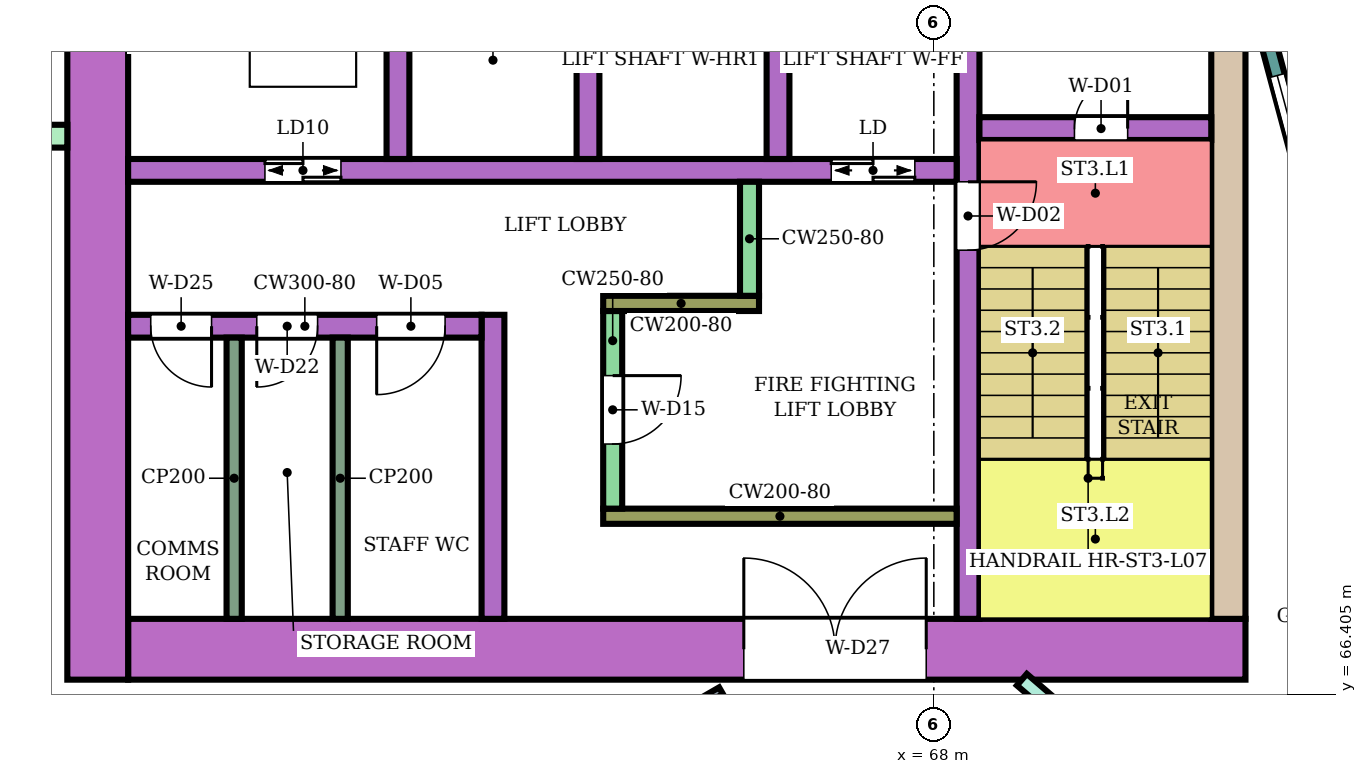
"""IFC4 building model, lengths in metres.
Left out: names, types, materials, properties, quantities, classifications, styles, units other than length and angle.
Written with IfcOpenShell. Run it as: python <this file> out.ifc"""

import sys

from ifc_helpers import new_model, si_unit, direction, frame, frame_2d, origin, place, context, subcontext, project, spatial, rectangle, extrude, element, fill, save


model = new_model("IFC4")
c1 = context("Model", 3, precision=1e-05, world=origin(), true_north=direction((0.0, 1.0)))
c2 = subcontext(c1, "Body", "Model", "MODEL_VIEW")
j1 = project(units=[si_unit("LENGTHUNIT", "METRE"), si_unit("PLANEANGLEUNIT", "RADIAN")], contexts=[c1])
p1 = place(None, origin())
s1 = spatial("IfcSite", under=j1, at=p1, CompositionType="ELEMENT")
p2 = place(p1, origin())
s2 = spatial("IfcBuilding", under=s1, at=p2, CompositionType="ELEMENT")
p3 = place(p2, frame((0.0, 0.0, 36.4)))
s3 = spatial("IfcBuildingStorey", under=s2, at=p3, CompositionType="ELEMENT", Elevation=36.4)
p4 = place(p3, frame((72.1, 67.0, 0.0), z_axis=(0.0, 0.0, 1.0), x_axis=(-1.0, 0.0, 0.0)))
e1 = element("IfcWall", 1, at=p4, inside=s3, PredefinedType="SHEAR", context=c2, shape_type="SweptSolid", body=[
    extrude(rectangle(XDim=14.7, YDim=0.8, at=frame_2d((7.35, 0.0))), origin(), (0.0, 0.0, 1.0), 3.48),
])
p5 = place(p4, frame((4.2, 0.0, 0.0)))
e2 = element("IfcOpeningElement", 2, at=p5, cuts=e1, PredefinedType="OPENING", context=c2, shape_type="SweptSolid", body=[
    extrude(rectangle(XDim=2.4, YDim=2.4, at=frame_2d((1.2, 1.2))), frame((0.0, 0.41, 0.0), z_axis=(0.0, -1.0, 0.0), x_axis=(1.0, 0.0, 0.0)), (0.0, 0.0, 1.0), 0.82),
])
p6 = place(p3, frame((71.875, 75.0, 0.0), z_axis=(0.0, 0.0, 1.0), x_axis=(0.0, -1.0, 0.0)))
e3 = element("IfcWall", 3, at=p6, inside=s3, PredefinedType="SHEAR", context=c2, shape_type="SweptSolid", body=[
    extrude(rectangle(XDim=7.6, YDim=0.45, at=frame_2d((3.8, 0.0))), origin(), (0.0, 0.0, 1.0), 3.48),
])
p7 = place(p3, frame((57.0, 83.4, 0.0), z_axis=(0.0, 0.0, 1.0), x_axis=(0.0, -1.0, 0.0)))
e4 = element("IfcWall", 4, at=p7, inside=s3, PredefinedType="SHEAR", context=c2, shape_type="SweptSolid", body=[
    extrude(rectangle(XDim=16.8, YDim=0.8, at=frame_2d((8.4, 0.0))), origin(), (0.0, 0.0, 1.0), 3.48),
])
p8 = place(p3, frame((68.45, 75.0, 0.0), z_axis=(0.0, 0.0, 1.0), x_axis=(0.0, -1.0, 0.0)))
e5 = element("IfcWall", 5, at=p8, inside=s3, PredefinedType="SHEAR", context=c2, shape_type="SweptSolid", body=[
    extrude(rectangle(XDim=7.6, YDim=0.3, at=frame_2d((3.8, 0.0))), origin(), (0.0, 0.0, 1.0), 3.48),
])
p9 = place(p8, frame((1.85, 0.0, 0.0)))
e6 = element("IfcOpeningElement", 6, at=p9, cuts=e5, PredefinedType="OPENING", context=c2, shape_type="SweptSolid", body=[
    extrude(rectangle(XDim=0.9, YDim=2.1, at=frame_2d((0.45, 1.05))), frame((0.0, 0.16, 0.0), z_axis=(0.0, -1.0, 0.0), x_axis=(1.0, 0.0, 0.0)), (0.0, 0.0, 1.0), 0.32),
])
p10 = place(p3, frame((71.65, 73.85, 0.0), z_axis=(0.0, 0.0, 1.0), x_axis=(-1.0, 0.0, 0.0)))
e7 = element("IfcWall", 7, at=p10, inside=s3, PredefinedType="SHEAR", context=c2, shape_type="SweptSolid", body=[
    extrude(rectangle(XDim=3.05, YDim=0.3, at=frame_2d((1.525, 0.0))), origin(), (0.0, 0.0, 1.0), 3.48),
])
p11 = place(p10, frame((1.1, 0.0, 0.0)))
e8 = element("IfcOpeningElement", 8, at=p11, cuts=e7, PredefinedType="OPENING", context=c2, shape_type="SweptSolid", body=[
    extrude(rectangle(XDim=0.7, YDim=2.0, at=frame_2d((0.35, 1.0))), frame((0.0, 0.16, 0.0), z_axis=(0.0, -1.0, 0.0), x_axis=(1.0, 0.0, 0.0)), (0.0, 0.0, 1.0), 0.32),
])
p12 = place(p3, frame((68.3, 73.3, 0.0), z_axis=(0.0, 0.0, 1.0), x_axis=(-1.0, 0.0, 0.0)))
e9 = element("IfcWall", 9, at=p12, inside=s3, PredefinedType="SHEAR", context=c2, shape_type="SweptSolid", body=[
    extrude(rectangle(XDim=10.9, YDim=0.3, at=frame_2d((5.45, 0.0))), origin(), (0.0, 0.0, 1.0), 3.48),
])
p13 = place(p12, frame((0.55, 0.0, 0.0)))
e10 = element("IfcOpeningElement", 10, at=p13, cuts=e9, PredefinedType="OPENING", context=c2, shape_type="SweptSolid", body=[
    extrude(rectangle(XDim=1.1, YDim=2.1, at=frame_2d((0.55, 1.05))), frame((0.0, 0.16, 0.0), z_axis=(0.0, -1.0, 0.0), x_axis=(1.0, 0.0, 0.0)), (0.0, 0.0, 1.0), 0.32),
])
p14 = place(p12, frame((8.1, 0.0, 0.0)))
e11 = element("IfcOpeningElement", 11, at=p14, cuts=e9, PredefinedType="OPENING", context=c2, shape_type="SweptSolid", body=[
    extrude(rectangle(XDim=1.0, YDim=2.1, at=frame_2d((0.5, 1.05))), frame((0.0, 0.16, 0.0), z_axis=(0.0, -1.0, 0.0), x_axis=(1.0, 0.0, 0.0)), (0.0, 0.0, 1.0), 0.32),
])
for number, where, z_axis, x_axis in (
    (12, (65.95, 76.0, 0.0), (0.0, 0.0, 1.0), (0.0, -1.0, 0.0)),
    (13, (63.45, 76.0, 0.0), (0.0, 0.0, 1.0), (0.0, -1.0, 0.0)),
    (14, (60.95, 76.0, 0.0), (0.0, 0.0, 1.0), (0.0, -1.0, 0.0)),
):
    element("IfcWall", number, at=place(p3, frame(where, z_axis=z_axis, x_axis=x_axis)), inside=s3, PredefinedType="SHEAR", context=c2, shape_type="SweptSolid", body=[
        extrude(rectangle(XDim=2.55, YDim=0.3, at=frame_2d((1.275, 0.0))), origin(), (0.0, 0.0, 1.0), 3.48),
    ])
p15 = place(p3, frame((68.3, 68.75, 0.0), z_axis=(0.0, 0.0, 1.0), x_axis=(-1.0, 0.0, 0.0)))
e15 = element("IfcWall", 15, at=p15, inside=s3, PredefinedType="SHEAR", context=c2, shape_type="SweptSolid", body=[
    extrude(rectangle(XDim=4.65, YDim=0.2, at=frame_2d((2.325, 0.0))), origin(), (0.0, 0.0, 1.0), 3.48),
])
p16 = place(p3, frame((63.775, 71.45, 0.0), z_axis=(0.0, 0.0, 1.0), x_axis=(0.0, -1.0, 0.0)))
e16 = element("IfcWall", 16, at=p16, inside=s3, PredefinedType="SHEAR", context=c2, shape_type="SweptSolid", body=[
    extrude(rectangle(XDim=2.6, YDim=0.25, at=frame_2d((1.3, 0.0))), origin(), (0.0, 0.0, 1.0), 3.48),
])
p17 = place(p16, frame((0.85, 0.0, 0.0)))
e17 = element("IfcOpeningElement", 17, at=p17, cuts=e16, PredefinedType="OPENING", context=c2, shape_type="SweptSolid", body=[
    extrude(rectangle(XDim=0.9, YDim=2.1, at=frame_2d((0.45, 1.05))), frame((0.0, 0.135, 0.0), z_axis=(0.0, -1.0, 0.0), x_axis=(1.0, 0.0, 0.0)), (0.0, 0.0, 1.0), 0.27),
])
p18 = place(p3, frame((65.7, 71.55, 0.0), z_axis=(0.0, 0.0, 1.0), x_axis=(-1.0, 0.0, 0.0)))
e18 = element("IfcWall", 18, at=p18, inside=s3, PredefinedType="SHEAR", context=c2, shape_type="SweptSolid", body=[
    extrude(rectangle(XDim=2.05, YDim=0.2, at=frame_2d((1.025, 0.0))), origin(), (0.0, 0.0, 1.0), 3.48),
])
p19 = place(p3, frame((65.575, 73.15, 0.0), z_axis=(0.0, 0.0, 1.0), x_axis=(0.0, -1.0, 0.0)))
e19 = element("IfcWall", 19, at=p19, inside=s3, PredefinedType="SHEAR", context=c2, shape_type="SweptSolid", body=[
    extrude(rectangle(XDim=1.5, YDim=0.25, at=frame_2d((0.75, 0.0))), origin(), (0.0, 0.0, 1.0), 3.48),
])
p20 = place(p3, frame((62.2, 71.4, 0.0), z_axis=(0.0, 0.0, 1.0), x_axis=(0.0, -1.0, 0.0)))
e20 = element("IfcWall", 20, at=p20, inside=s3, PredefinedType="SHEAR", context=c2, shape_type="SweptSolid", body=[
    extrude(rectangle(XDim=4.0, YDim=0.3, at=frame_2d((2.0, 0.0))), origin(), (0.0, 0.0, 1.0), 3.48),
])
p21 = place(p3, frame((62.05, 71.25, 0.0), z_axis=(0.0, 0.0, 1.0), x_axis=(-1.0, 0.0, 0.0)))
e21 = element("IfcWall", 21, at=p21, inside=s3, PredefinedType="SHEAR", context=c2, shape_type="SweptSolid", body=[
    extrude(rectangle(XDim=4.65, YDim=0.3, at=frame_2d((2.325, 0.0))), origin(), (0.0, 0.0, 1.0), 3.48),
])
p22 = place(p21, frame((0.48, 0.0, 0.0)))
e22 = element("IfcOpeningElement", 22, at=p22, cuts=e21, PredefinedType="OPENING", context=c2, shape_type="SweptSolid", body=[
    extrude(rectangle(XDim=0.9, YDim=2.1, at=frame_2d((0.45, 1.05))), frame((0.0, 0.16, 0.0), z_axis=(0.0, -1.0, 0.0), x_axis=(1.0, 0.0, 0.0)), (0.0, 0.0, 1.0), 0.32),
])
p23 = place(p21, frame((2.157, 0.0, 0.0)))
e23 = element("IfcOpeningElement", 23, at=p23, cuts=e21, PredefinedType="OPENING", context=c2, shape_type="SweptSolid", body=[
    extrude(rectangle(XDim=0.8, YDim=2.1, at=frame_2d((0.4, 1.05))), frame((0.0, 0.16, 0.0), z_axis=(0.0, -1.0, 0.0), x_axis=(1.0, 0.0, 0.0)), (0.0, 0.0, 1.0), 0.32),
])
p24 = place(p21, frame((3.552, 0.0, 0.0)))
e24 = element("IfcOpeningElement", 24, at=p24, cuts=e21, PredefinedType="OPENING", context=c2, shape_type="SweptSolid", body=[
    extrude(rectangle(XDim=0.8, YDim=2.1, at=frame_2d((0.4, 1.05))), frame((0.0, 0.16, 0.0), z_axis=(0.0, -1.0, 0.0), x_axis=(1.0, 0.0, 0.0)), (0.0, 0.0, 1.0), 0.32),
])
p25 = place(p3, frame((56.6, 73.75, 0.0), z_axis=(0.0, 0.0, 1.0), x_axis=(-1.0, 0.0, 0.0)))
e25 = element("IfcWall", 25, at=p25, inside=s3, PredefinedType="NOTDEFINED", context=c2, shape_type="SweptSolid", body=[
    extrude(rectangle(XDim=2.416, YDim=0.3, at=frame_2d((1.208, 0.0))), origin(), (0.0, 0.0, 1.0), 3.8),
])
p26 = place(p3, frame((72.396, 75.0, 0.0), z_axis=(0.0, 0.0, 1.0), x_axis=(0.258789828301, -0.965933654434, 0.0)))
e26 = element("IfcWall", 26, at=p26, inside=s3, PredefinedType="NOTDEFINED", context=c2, shape_type="SweptSolid", body=[
    extrude(rectangle(XDim=3.936, YDim=0.2, at=frame_2d((1.968, 0.0))), origin(), (0.0, 0.0, 1.0), 3.8),
])
p27 = place(p26, frame((0.468, 0.0, 0.9)))
e27 = element("IfcOpeningElement", 27, at=p27, cuts=e26, PredefinedType="OPENING", context=c2, shape_type="SweptSolid", body=[
    extrude(rectangle(XDim=3.0, YDim=2.3, at=frame_2d((1.5, 1.15))), frame((0.0, 0.11, 0.0), z_axis=(0.0, -1.0, 0.0), x_axis=(1.0, 0.0, 0.0)), (0.0, 0.0, 1.0), 0.22),
])
p28 = place(p3, frame((69.158, 66.6, 0.0), z_axis=(0.0, 0.0, 1.0), x_axis=(0.757976058094, -0.652282373943, 0.0)))
e28 = element("IfcWall", 28, at=p28, inside=s3, PredefinedType="PARTITIONING", context=c2, shape_type="SweptSolid", body=[
    extrude(rectangle(XDim=5.16, YDim=0.2, at=frame_2d((2.58, 0.0))), origin(), (0.0, 0.0, 1.0), 3.35),
])
p29 = place(p28, frame((1.6, 0.0, 0.0)))
e29 = element("IfcOpeningElement", 29, at=p29, cuts=e28, PredefinedType="OPENING", context=c2, shape_type="SweptSolid", body=[
    extrude(rectangle(XDim=1.0, YDim=2.1, at=frame_2d((0.5, 1.05))), frame((0.0, 0.11, 0.0), z_axis=(0.0, -1.0, 0.0), x_axis=(1.0, 0.0, 0.0)), (0.0, 0.0, 1.0), 0.22),
])
p30 = place(p3, frame((57.659, 62.101, 0.0), z_axis=(0.0, 0.0, 1.0), x_axis=(0.86602264145, 0.500004784474, 0.0)))
e30 = element("IfcWall", 30, at=p30, inside=s3, PredefinedType="PARTITIONING", context=c2, shape_type="SweptSolid", body=[
    extrude(rectangle(XDim=8.708, YDim=0.1, at=frame_2d((4.354, 0.0))), origin(), (0.0, 0.0, 1.0), 3.35),
])
p31 = place(p30, frame((3.929, 0.0, 0.0)))
e31 = element("IfcOpeningElement", 31, at=p31, cuts=e30, PredefinedType="OPENING", context=c2, shape_type="SweptSolid", body=[
    extrude(rectangle(XDim=0.9, YDim=2.1, at=frame_2d((0.45, 1.05))), frame((0.0, 0.06, 0.0), z_axis=(0.0, -1.0, 0.0), x_axis=(1.0, 0.0, 0.0)), (0.0, 0.0, 1.0), 0.12),
])
p32 = place(p3, frame((71.596, 64.635, 0.0), z_axis=(0.0, 0.0, 1.0), x_axis=(0.652285007511, 0.757973791748, 0.0)))
e32 = element("IfcWall", 32, at=p32, inside=s3, PredefinedType="PARTITIONING", context=c2, shape_type="SweptSolid", body=[
    extrude(rectangle(XDim=2.65, YDim=0.1, at=frame_2d((1.325, 0.0))), origin(), (0.0, 0.0, 1.0), 3.35),
])
p33 = place(p32, frame((0.6, 0.0, 0.0)))
e33 = element("IfcOpeningElement", 33, at=p33, cuts=e32, PredefinedType="OPENING", context=c2, shape_type="SweptSolid", body=[
    extrude(rectangle(XDim=0.8, YDim=2.1, at=frame_2d((0.4, 1.05))), frame((0.0, 0.06, 0.0), z_axis=(0.0, -1.0, 0.0), x_axis=(1.0, 0.0, 0.0)), (0.0, 0.0, 1.0), 0.12),
])
for number, where, z_axis, x_axis in (
    (34, (60.19, 71.1, 0.0), (0.0, 0.0, 1.0), (0.0, -1.0, 0.0)),
    (35, (58.795, 71.1, 0.0), (0.0, 0.0, 1.0), (0.0, -1.0, 0.0)),
):
    element("IfcWall", number, at=place(p3, frame(where, z_axis=z_axis, x_axis=x_axis)), inside=s3, PredefinedType="PARTITIONING", context=c2, shape_type="SweptSolid", body=[
        extrude(rectangle(XDim=3.7, YDim=0.2, at=frame_2d((1.85, 0.0))), origin(), (0.0, 0.0, 1.0), 3.48),
    ])
p34 = place(p27, origin())
e36 = element("IfcWindow", 36, at=p34, inside=s3, PartitioningType="SINGLE_PANEL", PredefinedType="WINDOW", context=c2, shape_type="SweptSolid", body=[
    extrude(rectangle(XDim=3.0, YDim=2.3, at=frame_2d((1.5, 1.15))), frame((0.0, 0.03, 0.0), z_axis=(0.0, -1.0, 0.0), x_axis=(1.0, 0.0, 0.0)), (0.0, 0.0, 1.0), 0.06),
])
fill(e27, e36)
p35 = place(p11, frame((0.7, 0.0, 0.0), z_axis=(0.0, 0.0, 1.0), x_axis=(-1.0, 0.0, 0.0)))
e37 = element("IfcDoor", 37, at=p35, inside=s3, OperationType="SINGLE_SWING_RIGHT", PredefinedType="DOOR", context=c2, shape_type="SweptSolid", body=[
    extrude(rectangle(XDim=0.7, YDim=2.0, at=frame_2d((0.35, 1.0))), frame((0.0, 0.025, 0.0), z_axis=(0.0, -1.0, 0.0), x_axis=(1.0, 0.0, 0.0)), (0.0, 0.0, 1.0), 0.05),
])
fill(e8, e37)
p36 = place(p9, origin())
e38 = element("IfcDoor", 38, at=p36, inside=s3, OperationType="SINGLE_SWING_LEFT", PredefinedType="DOOR", context=c2, shape_type="SweptSolid", body=[
    extrude(rectangle(XDim=0.9, YDim=2.1, at=frame_2d((0.45, 1.05))), frame((0.0, 0.025, 0.0), z_axis=(0.0, -1.0, 0.0), x_axis=(1.0, 0.0, 0.0)), (0.0, 0.0, 1.0), 0.05),
])
fill(e6, e38)
p37 = place(p13, origin())
e39 = element("IfcDoor", 39, at=p37, inside=s3, OperationType="DOUBLE_DOOR_SLIDING", PredefinedType="DOOR", context=c2, shape_type="SweptSolid", body=[
    extrude(rectangle(XDim=1.1, YDim=2.1, at=frame_2d((0.55, 1.05))), frame((0.0, 0.025, 0.0), z_axis=(0.0, -1.0, 0.0), x_axis=(1.0, 0.0, 0.0)), (0.0, 0.0, 1.0), 0.05),
])
fill(e10, e39)
p38 = place(p14, origin())
e40 = element("IfcDoor", 40, at=p38, inside=s3, OperationType="DOUBLE_DOOR_SLIDING", PredefinedType="DOOR", context=c2, shape_type="SweptSolid", body=[
    extrude(rectangle(XDim=1.0, YDim=2.1, at=frame_2d((0.5, 1.05))), frame((0.0, 0.025, 0.0), z_axis=(0.0, -1.0, 0.0), x_axis=(1.0, 0.0, 0.0)), (0.0, 0.0, 1.0), 0.05),
])
fill(e11, e40)
p39 = place(p17, origin())
e41 = element("IfcDoor", 41, at=p39, inside=s3, OperationType="SINGLE_SWING_LEFT", PredefinedType="DOOR", context=c2, shape_type="SweptSolid", body=[
    extrude(rectangle(XDim=0.9, YDim=2.1, at=frame_2d((0.45, 1.05))), frame((0.0, 0.025, 0.0), z_axis=(0.0, -1.0, 0.0), x_axis=(1.0, 0.0, 0.0)), (0.0, 0.0, 1.0), 0.05),
])
fill(e17, e41)
p40 = place(p22, origin())
e42 = element("IfcDoor", 42, at=p40, inside=s3, OperationType="SINGLE_SWING_RIGHT", PredefinedType="DOOR", context=c2, shape_type="SweptSolid", body=[
    extrude(rectangle(XDim=0.9, YDim=2.1, at=frame_2d((0.45, 1.05))), frame((0.0, 0.025, 0.0), z_axis=(0.0, -1.0, 0.0), x_axis=(1.0, 0.0, 0.0)), (0.0, 0.0, 1.0), 0.05),
])
fill(e22, e42)
p41 = place(p23, origin())
e43 = element("IfcDoor", 43, at=p41, inside=s3, OperationType="SINGLE_SWING_RIGHT", PredefinedType="DOOR", context=c2, shape_type="SweptSolid", body=[
    extrude(rectangle(XDim=0.8, YDim=2.1, at=frame_2d((0.4, 1.05))), frame((0.0, 0.025, 0.0), z_axis=(0.0, -1.0, 0.0), x_axis=(1.0, 0.0, 0.0)), (0.0, 0.0, 1.0), 0.05),
])
fill(e23, e43)
p42 = place(p24, origin())
e44 = element("IfcDoor", 44, at=p42, inside=s3, OperationType="SINGLE_SWING_LEFT", PredefinedType="DOOR", context=c2, shape_type="SweptSolid", body=[
    extrude(rectangle(XDim=0.8, YDim=2.1, at=frame_2d((0.4, 1.05))), frame((0.0, 0.025, 0.0), z_axis=(0.0, -1.0, 0.0), x_axis=(1.0, 0.0, 0.0)), (0.0, 0.0, 1.0), 0.05),
])
fill(e24, e44)
p43 = place(p5, frame((2.4, 0.0, 0.0), z_axis=(0.0, 0.0, 1.0), x_axis=(-1.0, 0.0, 0.0)))
e45 = element("IfcDoor", 45, at=p43, inside=s3, OperationType="DOUBLE_DOOR_SINGLE_SWING", PredefinedType="DOOR", context=c2, shape_type="SweptSolid", body=[
    extrude(rectangle(XDim=2.4, YDim=2.4, at=frame_2d((1.2, 1.2))), frame((0.0, 0.025, 0.0), z_axis=(0.0, -1.0, 0.0), x_axis=(1.0, 0.0, 0.0)), (0.0, 0.0, 1.0), 0.05),
])
fill(e2, e45)
save(model, sys.argv[1])
